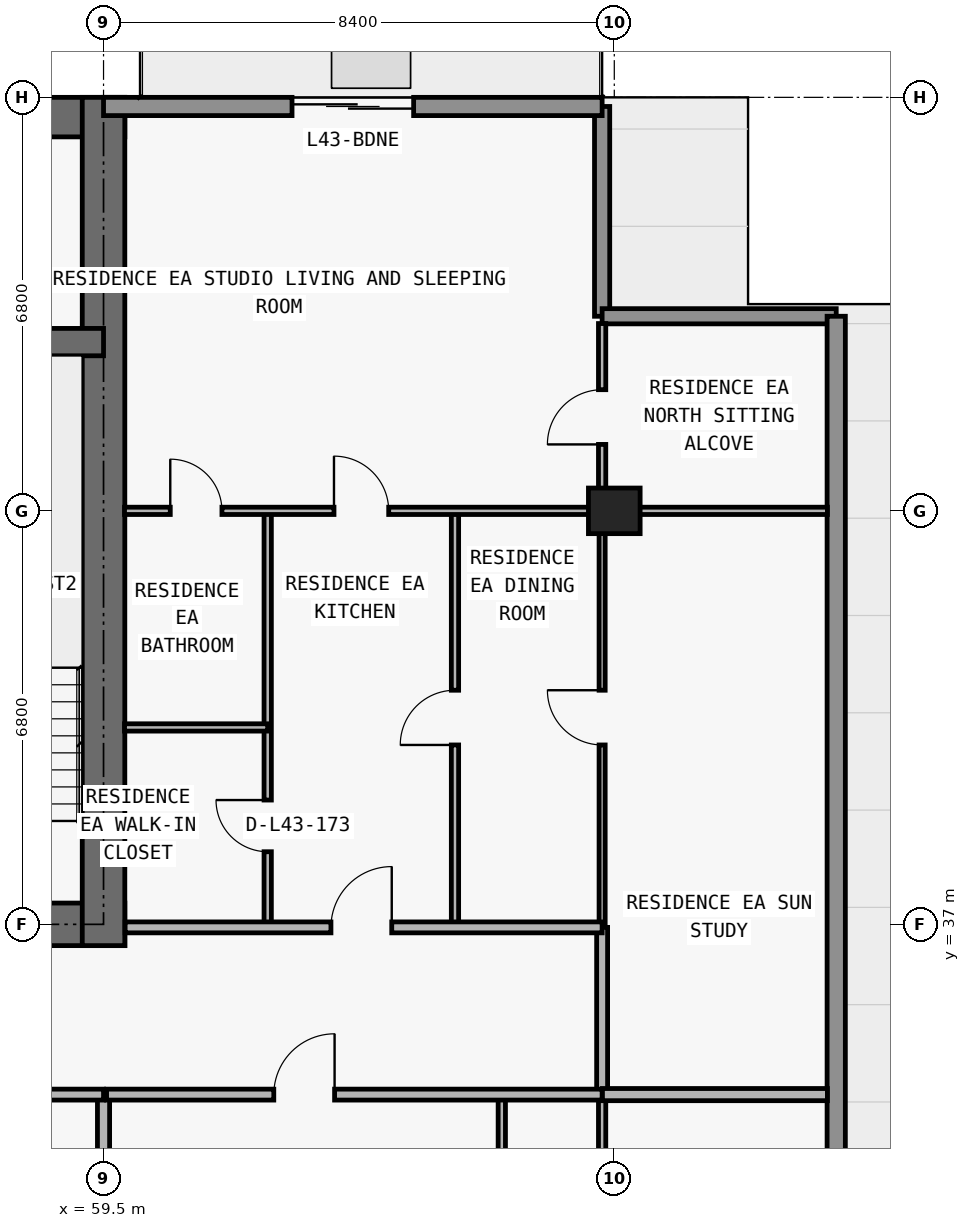
"""IFC4 building model, lengths in metres.
Left out: names, types, materials, properties, quantities, classifications, styles, units other than length and angle.
Written with IfcOpenShell. Run it as: python <this file> out.ifc"""

import sys

from ifc_helpers import new_model, si_unit, direction, frame, frame_2d, origin, origin_2d, place, context, subcontext, project, spatial, rectangle, extrude, element, fill, save


model = new_model("IFC4")
c1 = context("Model", 3, precision=1e-05, world=origin(), true_north=direction((0.0, 1.0)))
c2 = subcontext(c1, "Body", "Model", "MODEL_VIEW")
j1 = project(units=[si_unit("LENGTHUNIT", "METRE"), si_unit("PLANEANGLEUNIT", "RADIAN")], contexts=[c1])
p1 = place(None, origin())
s1 = spatial("IfcSite", under=j1, at=p1, CompositionType="ELEMENT")
p2 = place(p1, origin())
s2 = spatial("IfcBuilding", under=s1, at=p2, CompositionType="ELEMENT")
p3 = place(p2, frame((0.0, 0.0, 157.2)))
s3 = spatial("IfcBuildingStorey", under=s2, at=p3, CompositionType="ELEMENT", Elevation=157.2)
p4 = place(p3, frame((67.9, 43.8, 0.0), z_axis=(0.0, 0.0, 1.0), x_axis=(1.0, 0.0, 0.0)))
e1 = element("IfcColumn", 1, at=p4, inside=s3, PredefinedType="COLUMN", context=c2, shape_type="SweptSolid", body=[
    extrude(rectangle(XDim=0.85, YDim=0.75, at=origin_2d()), origin(), (0.0, 0.0, 1.0), 3.05),
])
p5 = place(p3, frame((17.95, 37.0, 0.0), z_axis=(0.0, 0.0, 1.0), x_axis=(1.0, 0.0, 0.0)))
e2 = element("IfcWall", 2, at=p5, inside=s3, PredefinedType="SHEAR", context=c2, shape_type="SweptSolid", body=[
    extrude(rectangle(XDim=41.9, YDim=0.7, at=frame_2d((20.95, 0.0))), origin(), (0.0, 0.0, 1.0), 3.05),
])
p6 = place(p5, frame((14.35, 0.0, 0.0)))
e3 = element("IfcOpeningElement", 3, at=p6, cuts=e2, PredefinedType="OPENING", context=c2, shape_type="SweptSolid", body=[
    extrude(rectangle(XDim=1.1, YDim=2.15, at=frame_2d((0.55, 1.075))), frame((0.0, 0.36, 0.0), z_axis=(0.0, -1.0, 0.0), x_axis=(1.0, 0.0, 0.0)), (0.0, 0.0, 1.0), 0.72),
])
p7 = place(p5, frame((6.2, 0.0, 0.0)))
e4 = element("IfcOpeningElement", 4, at=p7, cuts=e2, PredefinedType="OPENING", context=c2, shape_type="SweptSolid", body=[
    extrude(rectangle(XDim=1.05, YDim=2.15, at=frame_2d((0.525, 1.075))), frame((0.0, 0.36, 0.0), z_axis=(0.0, -1.0, 0.0), x_axis=(1.0, 0.0, 0.0)), (0.0, 0.0, 1.0), 0.72),
])
p8 = place(p5, frame((34.7, 0.0, 0.0)))
e5 = element("IfcOpeningElement", 5, at=p8, cuts=e2, PredefinedType="OPENING", context=c2, shape_type="SweptSolid", body=[
    extrude(rectangle(XDim=1.05, YDim=2.15, at=frame_2d((0.525, 1.075))), frame((0.0, 0.36, 0.0), z_axis=(0.0, -1.0, 0.0), x_axis=(1.0, 0.0, 0.0)), (0.0, 0.0, 1.0), 0.72),
])
p9 = place(p5, frame((10.812, 0.0, 0.0)))
e6 = element("IfcOpeningElement", 6, at=p9, cuts=e2, PredefinedType="OPENING", context=c2, shape_type="SweptSolid", body=[
    extrude(rectangle(XDim=1.05, YDim=2.15, at=frame_2d((0.525, 1.075))), frame((0.0, 0.36, 0.0), z_axis=(0.0, -1.0, 0.0), x_axis=(1.0, 0.0, 0.0)), (0.0, 0.0, 1.0), 0.72),
])
p10 = place(p5, frame((24.05, 0.0, 0.0)))
e7 = element("IfcOpeningElement", 7, at=p10, cuts=e2, PredefinedType="OPENING", context=c2, shape_type="SweptSolid", body=[
    extrude(rectangle(XDim=1.05, YDim=2.15, at=frame_2d((0.525, 1.075))), frame((0.0, 0.36, 0.0), z_axis=(0.0, -1.0, 0.0), x_axis=(1.0, 0.0, 0.0)), (0.0, 0.0, 1.0), 0.72),
])
p11 = place(p3, frame((17.95, 50.275, 0.0), z_axis=(0.0, 0.0, 1.0), x_axis=(1.0, 0.0, 0.0)))
e8 = element("IfcWall", 8, at=p11, inside=s3, PredefinedType="SHEAR", context=c2, shape_type="SweptSolid", body=[
    extrude(rectangle(XDim=41.9, YDim=0.65, at=frame_2d((20.95, 0.0))), origin(), (0.0, 0.0, 1.0), 3.05),
])
p12 = place(p3, frame((59.5, 36.65, 0.0), z_axis=(0.0, 0.0, 1.0), x_axis=(0.0, 1.0, 0.0)))
e9 = element("IfcWall", 9, at=p12, inside=s3, PredefinedType="SHEAR", context=c2, shape_type="SweptSolid", body=[
    extrude(rectangle(XDim=13.95, YDim=0.7, at=frame_2d((6.975, 0.0))), origin(), (0.0, 0.0, 1.0), 3.05),
])
p13 = place(p3, frame((18.3, 46.575, 0.0), z_axis=(0.0, 0.0, 1.0), x_axis=(1.0, 0.0, 0.0)))
e10 = element("IfcWall", 10, at=p13, inside=s3, PredefinedType="SHEAR", context=c2, shape_type="SweptSolid", body=[
    extrude(rectangle(XDim=41.2, YDim=0.45, at=frame_2d((20.6, 0.0))), origin(), (0.0, 0.0, 1.0), 3.05),
])
p14 = place(p13, frame((7.575, 0.0, 0.0)))
e11 = element("IfcOpeningElement", 11, at=p14, cuts=e10, PredefinedType="OPENING", context=c2, shape_type="SweptSolid", body=[
    extrude(rectangle(XDim=1.05, YDim=2.15, at=frame_2d((0.525, 1.075))), frame((0.0, 0.235, 0.0), z_axis=(0.0, -1.0, 0.0), x_axis=(1.0, 0.0, 0.0)), (0.0, 0.0, 1.0), 0.47),
])
p15 = place(p13, frame((32.625, 0.0, 0.0)))
e12 = element("IfcOpeningElement", 12, at=p15, cuts=e10, PredefinedType="OPENING", context=c2, shape_type="SweptSolid", body=[
    extrude(rectangle(XDim=1.05, YDim=2.15, at=frame_2d((0.525, 1.075))), frame((0.0, 0.235, 0.0), z_axis=(0.0, -1.0, 0.0), x_axis=(1.0, 0.0, 0.0)), (0.0, 0.0, 1.0), 0.47),
])
p16 = place(p3, frame((67.7, 50.45, 0.0), z_axis=(0.0, 0.0, 1.0), x_axis=(0.0, -1.0, 0.0)))
e13 = element("IfcWall", 13, at=p16, inside=s3, PredefinedType="ELEMENTEDWALL", context=c2, shape_type="SweptSolid", body=[
    extrude(rectangle(XDim=3.45, YDim=0.25, at=frame_2d((1.725, 0.0))), origin(), (0.0, 0.0, 1.0), 3.05),
])
p17 = place(p3, frame((67.7, 47.0, 0.0), z_axis=(0.0, 0.0, 1.0), x_axis=(1.0, 0.0, 0.0)))
e14 = element("IfcWall", 14, at=p17, inside=s3, PredefinedType="ELEMENTEDWALL", context=c2, shape_type="SweptSolid", body=[
    extrude(rectangle(XDim=3.85, YDim=0.25, at=frame_2d((1.925, 0.0))), origin(), (0.0, 0.0, 1.0), 3.05),
])
p18 = place(p3, frame((71.55, 47.0, 0.0), z_axis=(0.0, 0.0, 1.0), x_axis=(0.0, -1.0, 0.0)))
e15 = element("IfcWall", 15, at=p18, inside=s3, PredefinedType="STANDARD", context=c2, shape_type="SweptSolid", body=[
    extrude(rectangle(XDim=17.9, YDim=0.3, at=frame_2d((8.95, 0.0))), origin(), (0.0, 0.0, 1.0), 3.05),
])
p19 = place(p3, frame((59.5, 50.45, 0.0), z_axis=(0.0, 0.0, 1.0), x_axis=(1.0, 0.0, 0.0)))
e16 = element("IfcWall", 16, at=p19, inside=s3, PredefinedType="STANDARD", context=c2, shape_type="SweptSolid", body=[
    extrude(rectangle(XDim=8.2, YDim=0.3, at=frame_2d((4.1, 0.0))), origin(), (0.0, 0.0, 1.0), 3.05),
])
p20 = place(p19, frame((3.1, 0.0, 0.0)))
e17 = element("IfcOpeningElement", 17, at=p20, cuts=e16, PredefinedType="OPENING", context=c2, shape_type="SweptSolid", body=[
    extrude(rectangle(XDim=2.0, YDim=2.3, at=frame_2d((1.0, 1.15))), frame((0.0, 0.16, 0.0), z_axis=(0.0, -1.0, 0.0), x_axis=(1.0, 0.0, 0.0)), (0.0, 0.0, 1.0), 0.32),
])
p21 = place(p3, frame((59.5, 27.64, 0.0), z_axis=(0.0, 0.0, 1.0), x_axis=(0.0, 1.0, 0.0)))
e18 = element("IfcWall", 18, at=p21, inside=s3, PredefinedType="PARTITIONING", context=c2, shape_type="SweptSolid", body=[
    extrude(rectangle(XDim=6.56, YDim=0.2, at=frame_2d((3.28, 0.0))), origin(), (0.0, 0.0, 1.0), 2.263),
])
p22 = place(p3, frame((62.2, 37.0, 0.0), z_axis=(0.0, 0.0, 1.0), x_axis=(0.0, 1.0, 0.0)))
e19 = element("IfcWall", 19, at=p22, inside=s3, PredefinedType="PARTITIONING", context=c2, shape_type="SweptSolid", body=[
    extrude(rectangle(XDim=6.8, YDim=0.12, at=frame_2d((3.4, 0.0))), origin(), (0.0, 0.0, 1.0), 3.05),
])
p23 = place(p22, frame((1.194, 0.0, 0.0)))
e20 = element("IfcOpeningElement", 20, at=p23, cuts=e19, PredefinedType="OPENING", context=c2, shape_type="SweptSolid", body=[
    extrude(rectangle(XDim=0.85, YDim=2.1, at=frame_2d((0.425, 1.05))), frame((0.0, 0.07, 0.0), z_axis=(0.0, -1.0, 0.0), x_axis=(1.0, 0.0, 0.0)), (0.0, 0.0, 1.0), 0.14),
])
p24 = place(p3, frame((65.28, 37.0, 0.0), z_axis=(0.0, 0.0, 1.0), x_axis=(0.0, 1.0, 0.0)))
e21 = element("IfcWall", 21, at=p24, inside=s3, PredefinedType="PARTITIONING", context=c2, shape_type="SweptSolid", body=[
    extrude(rectangle(XDim=6.8, YDim=0.12, at=frame_2d((3.4, 0.0))), origin(), (0.0, 0.0, 1.0), 3.05),
])
p25 = place(p24, frame((2.95, 0.0, 0.0)))
e22 = element("IfcOpeningElement", 22, at=p25, cuts=e21, PredefinedType="OPENING", context=c2, shape_type="SweptSolid", body=[
    extrude(rectangle(XDim=0.9, YDim=2.15, at=frame_2d((0.45, 1.075))), frame((0.0, 0.07, 0.0), z_axis=(0.0, -1.0, 0.0), x_axis=(1.0, 0.0, 0.0)), (0.0, 0.0, 1.0), 0.14),
])
p26 = place(p3, frame((66.05, 27.64, 0.0), z_axis=(0.0, 0.0, 1.0), x_axis=(0.0, 1.0, 0.0)))
e23 = element("IfcWall", 23, at=p26, inside=s3, PredefinedType="PARTITIONING", context=c2, shape_type="SweptSolid", body=[
    extrude(rectangle(XDim=6.56, YDim=0.12, at=frame_2d((3.28, 0.0))), origin(), (0.0, 0.0, 1.0), 3.05),
])
p27 = place(p26, frame((2.855, 0.0, 0.0)))
e24 = element("IfcOpeningElement", 24, at=p27, cuts=e23, PredefinedType="OPENING", context=c2, shape_type="SweptSolid", body=[
    extrude(rectangle(XDim=0.85, YDim=2.1, at=frame_2d((0.425, 1.05))), frame((0.0, 0.07, 0.0), z_axis=(0.0, -1.0, 0.0), x_axis=(1.0, 0.0, 0.0)), (0.0, 0.0, 1.0), 0.14),
])
p28 = place(p3, frame((67.7, 27.64, 0.0), z_axis=(0.0, 0.0, 1.0), x_axis=(0.0, 1.0, 0.0)))
e25 = element("IfcWall", 25, at=p28, inside=s3, PredefinedType="PARTITIONING", context=c2, shape_type="SweptSolid", body=[
    extrude(rectangle(XDim=6.56, YDim=0.12, at=frame_2d((3.28, 0.0))), origin(), (0.0, 0.0, 1.0), 2.263),
])
p29 = place(p3, frame((67.7, 34.205, 0.0), z_axis=(0.0, 0.0, 1.0), x_axis=(0.0, 1.0, 0.0)))
e26 = element("IfcWall", 26, at=p29, inside=s3, PredefinedType="PARTITIONING", context=c2, shape_type="SweptSolid", body=[
    extrude(rectangle(XDim=2.745, YDim=0.18, at=frame_2d((1.373, 0.0))), origin(), (0.0, 0.0, 1.0), 2.263),
])
p30 = place(p3, frame((67.7, 37.0, 0.0), z_axis=(0.0, 0.0, 1.0), x_axis=(0.0, 1.0, 0.0)))
e27 = element("IfcWall", 27, at=p30, inside=s3, PredefinedType="MOVABLE", context=c2, shape_type="SweptSolid", body=[
    extrude(rectangle(XDim=6.8, YDim=0.1, at=frame_2d((3.4, 0.0))), origin(), (0.0, 0.0, 1.0), 2.263),
])
p31 = place(p30, frame((2.95, 0.0, 0.0)))
e28 = element("IfcOpeningElement", 28, at=p31, cuts=e27, PredefinedType="OPENING", context=c2, shape_type="SweptSolid", body=[
    extrude(rectangle(XDim=0.9, YDim=2.15, at=frame_2d((0.45, 1.075))), frame((0.0, 0.06, 0.0), z_axis=(0.0, -1.0, 0.0), x_axis=(1.0, 0.0, 0.0)), (0.0, 0.0, 1.0), 0.12),
])
p32 = place(p3, frame((67.7, 43.805, 0.0), z_axis=(0.0, 0.0, 1.0), x_axis=(0.0, 1.0, 0.0)))
e29 = element("IfcWall", 29, at=p32, inside=s3, PredefinedType="PARTITIONING", context=c2, shape_type="SweptSolid", body=[
    extrude(rectangle(XDim=3.075, YDim=0.12, at=frame_2d((1.538, 0.0))), origin(), (0.0, 0.0, 1.0), 3.05),
])
p33 = place(p32, frame((1.087, 0.0, 0.0)))
e30 = element("IfcOpeningElement", 30, at=p33, cuts=e29, PredefinedType="OPENING", context=c2, shape_type="SweptSolid", body=[
    extrude(rectangle(XDim=0.9, YDim=2.15, at=frame_2d((0.45, 1.075))), frame((0.0, 0.07, 0.0), z_axis=(0.0, -1.0, 0.0), x_axis=(1.0, 0.0, 0.0)), (0.0, 0.0, 1.0), 0.14),
])
p34 = place(p3, frame((55.9, 34.2, 0.0), z_axis=(0.0, 0.0, 1.0), x_axis=(1.0, 0.0, 0.0)))
e31 = element("IfcWall", 31, at=p34, inside=s3, PredefinedType="PARTITIONING", context=c2, shape_type="SweptSolid", body=[
    extrude(rectangle(XDim=3.6, YDim=0.18, at=frame_2d((1.8, 0.0))), origin(), (0.0, 0.0, 1.0), 3.05),
])
p35 = place(p3, frame((59.55, 34.2, 0.0), z_axis=(0.0, 0.0, 1.0), x_axis=(1.0, 0.0, 0.0)))
e32 = element("IfcWall", 32, at=p35, inside=s3, PredefinedType="PARTITIONING", context=c2, shape_type="SweptSolid", body=[
    extrude(rectangle(XDim=8.15, YDim=0.18, at=frame_2d((4.075, 0.0))), origin(), (0.0, 0.0, 1.0), 3.05),
])
p36 = place(p35, frame((2.75, 0.0, 0.0)))
e33 = element("IfcOpeningElement", 33, at=p36, cuts=e32, PredefinedType="OPENING", context=c2, shape_type="SweptSolid", body=[
    extrude(rectangle(XDim=1.0, YDim=2.2, at=frame_2d((0.5, 1.1))), frame((0.0, 0.1, 0.0), z_axis=(0.0, -1.0, 0.0), x_axis=(1.0, 0.0, 0.0)), (0.0, 0.0, 1.0), 0.2),
])
p37 = place(p3, frame((67.705, 34.2, 0.0), z_axis=(0.0, 0.0, 1.0), x_axis=(1.0, 0.0, 0.0)))
e34 = element("IfcWall", 34, at=p37, inside=s3, PredefinedType="PARTITIONING", context=c2, shape_type="SweptSolid", body=[
    extrude(rectangle(XDim=3.7, YDim=0.2, at=frame_2d((1.85, 0.0))), origin(), (0.0, 0.0, 1.0), 3.05),
])
p38 = place(p3, frame((59.855, 36.95, 0.0), z_axis=(0.0, 0.0, 1.0), x_axis=(1.0, 0.0, 0.0)))
e35 = element("IfcWall", 35, at=p38, inside=s3, PredefinedType="PARTITIONING", context=c2, shape_type="SweptSolid", body=[
    extrude(rectangle(XDim=7.845, YDim=0.18, at=frame_2d((3.922, 0.0))), origin(), (0.0, 0.0, 1.0), 3.05),
])
p39 = place(p38, frame((3.385, 0.0, 0.0)))
e36 = element("IfcOpeningElement", 36, at=p39, cuts=e35, PredefinedType="OPENING", context=c2, shape_type="SweptSolid", body=[
    extrude(rectangle(XDim=1.0, YDim=2.2, at=frame_2d((0.5, 1.1))), frame((0.0, 0.1, 0.0), z_axis=(0.0, -1.0, 0.0), x_axis=(1.0, 0.0, 0.0)), (0.0, 0.0, 1.0), 0.2),
])
p40 = place(p3, frame((59.845, 40.238, 0.0), z_axis=(0.0, 0.0, 1.0), x_axis=(1.0, 0.0, 0.0)))
e37 = element("IfcWall", 37, at=p40, inside=s3, PredefinedType="PARTITIONING", context=c2, shape_type="SweptSolid", body=[
    extrude(rectangle(XDim=2.355, YDim=0.12, at=frame_2d((1.177, 0.0))), origin(), (0.0, 0.0, 1.0), 3.05),
])
p41 = place(p3, frame((59.845, 43.8, 0.0), z_axis=(0.0, 0.0, 1.0), x_axis=(1.0, 0.0, 0.0)))
e38 = element("IfcWall", 38, at=p41, inside=s3, PredefinedType="PARTITIONING", context=c2, shape_type="SweptSolid", body=[
    extrude(rectangle(XDim=11.56, YDim=0.12, at=frame_2d((5.78, 0.0))), origin(), (0.0, 0.0, 1.0), 2.418),
])
p42 = place(p41, frame((3.445, 0.0, 0.0)))
e39 = element("IfcOpeningElement", 39, at=p42, cuts=e38, PredefinedType="OPENING", context=c2, shape_type="SweptSolid", body=[
    extrude(rectangle(XDim=0.9, YDim=2.15, at=frame_2d((0.45, 1.075))), frame((0.0, 0.07, 0.0), z_axis=(0.0, -1.0, 0.0), x_axis=(1.0, 0.0, 0.0)), (0.0, 0.0, 1.0), 0.14),
])
p43 = place(p41, frame((0.752, 0.0, 0.0)))
e40 = element("IfcOpeningElement", 40, at=p43, cuts=e38, PredefinedType="OPENING", context=c2, shape_type="SweptSolid", body=[
    extrude(rectangle(XDim=0.85, YDim=2.1, at=frame_2d((0.425, 1.05))), frame((0.0, 0.07, 0.0), z_axis=(0.0, -1.0, 0.0), x_axis=(1.0, 0.0, 0.0)), (0.0, 0.0, 1.0), 0.14),
])
p44 = place(p20, origin())
e41 = element("IfcDoor", 41, at=p44, inside=s3, OperationType="DOUBLE_DOOR_SLIDING", PredefinedType="DOOR", context=c2, shape_type="SweptSolid", body=[
    extrude(rectangle(XDim=2.0, YDim=2.3, at=frame_2d((1.0, 1.15))), frame((0.0, 0.025, 0.0), z_axis=(0.0, -1.0, 0.0), x_axis=(1.0, 0.0, 0.0)), (0.0, 0.0, 1.0), 0.05),
])
fill(e17, e41)
p45 = place(p36, origin())
e42 = element("IfcDoor", 42, at=p45, inside=s3, OperationType="SINGLE_SWING_RIGHT", PredefinedType="DOOR", context=c2, shape_type="SweptSolid", body=[
    extrude(rectangle(XDim=1.0, YDim=2.2, at=frame_2d((0.5, 1.1))), frame((0.0, 0.025, 0.0), z_axis=(0.0, -1.0, 0.0), x_axis=(1.0, 0.0, 0.0)), (0.0, 0.0, 1.0), 0.05),
])
fill(e33, e42)
p46 = place(p25, origin())
e43 = element("IfcDoor", 43, at=p46, inside=s3, OperationType="SINGLE_SWING_LEFT", PredefinedType="DOOR", context=c2, shape_type="SweptSolid", body=[
    extrude(rectangle(XDim=0.9, YDim=2.15, at=frame_2d((0.45, 1.075))), frame((0.0, 0.025, 0.0), z_axis=(0.0, -1.0, 0.0), x_axis=(1.0, 0.0, 0.0)), (0.0, 0.0, 1.0), 0.05),
])
fill(e22, e43)
p47 = place(p39, origin())
e44 = element("IfcDoor", 44, at=p47, inside=s3, OperationType="SINGLE_SWING_RIGHT", PredefinedType="DOOR", context=c2, shape_type="SweptSolid", body=[
    extrude(rectangle(XDim=1.0, YDim=2.2, at=frame_2d((0.5, 1.1))), frame((0.0, 0.025, 0.0), z_axis=(0.0, -1.0, 0.0), x_axis=(1.0, 0.0, 0.0)), (0.0, 0.0, 1.0), 0.05),
])
fill(e36, e44)
p48 = place(p42, origin())
e45 = element("IfcDoor", 45, at=p48, inside=s3, OperationType="SINGLE_SWING_LEFT", PredefinedType="DOOR", context=c2, shape_type="SweptSolid", body=[
    extrude(rectangle(XDim=0.9, YDim=2.15, at=frame_2d((0.45, 1.075))), frame((0.0, 0.025, 0.0), z_axis=(0.0, -1.0, 0.0), x_axis=(1.0, 0.0, 0.0)), (0.0, 0.0, 1.0), 0.05),
])
fill(e39, e45)
p49 = place(p23, origin())
e46 = element("IfcDoor", 46, at=p49, inside=s3, OperationType="SINGLE_SWING_RIGHT", PredefinedType="DOOR", context=c2, shape_type="SweptSolid", body=[
    extrude(rectangle(XDim=0.85, YDim=2.1, at=frame_2d((0.425, 1.05))), frame((0.0, 0.025, 0.0), z_axis=(0.0, -1.0, 0.0), x_axis=(1.0, 0.0, 0.0)), (0.0, 0.0, 1.0), 0.05),
])
fill(e20, e46)
p50 = place(p43, origin())
e47 = element("IfcDoor", 47, at=p50, inside=s3, OperationType="SINGLE_SWING_LEFT", PredefinedType="DOOR", context=c2, shape_type="SweptSolid", body=[
    extrude(rectangle(XDim=0.85, YDim=2.1, at=frame_2d((0.425, 1.05))), frame((0.0, 0.025, 0.0), z_axis=(0.0, -1.0, 0.0), x_axis=(1.0, 0.0, 0.0)), (0.0, 0.0, 1.0), 0.05),
])
fill(e40, e47)
p51 = place(p31, origin())
e48 = element("IfcDoor", 48, at=p51, inside=s3, OperationType="SINGLE_SWING_RIGHT", PredefinedType="DOOR", context=c2, shape_type="SweptSolid", body=[
    extrude(rectangle(XDim=0.9, YDim=2.15, at=frame_2d((0.45, 1.075))), frame((0.0, 0.025, 0.0), z_axis=(0.0, -1.0, 0.0), x_axis=(1.0, 0.0, 0.0)), (0.0, 0.0, 1.0), 0.05),
])
fill(e28, e48)
p52 = place(p33, origin())
e49 = element("IfcDoor", 49, at=p52, inside=s3, OperationType="SINGLE_SWING_LEFT", PredefinedType="DOOR", context=c2, shape_type="SweptSolid", body=[
    extrude(rectangle(XDim=0.9, YDim=2.15, at=frame_2d((0.45, 1.075))), frame((0.0, 0.025, 0.0), z_axis=(0.0, -1.0, 0.0), x_axis=(1.0, 0.0, 0.0)), (0.0, 0.0, 1.0), 0.05),
])
fill(e30, e49)
save(model, sys.argv[1])
